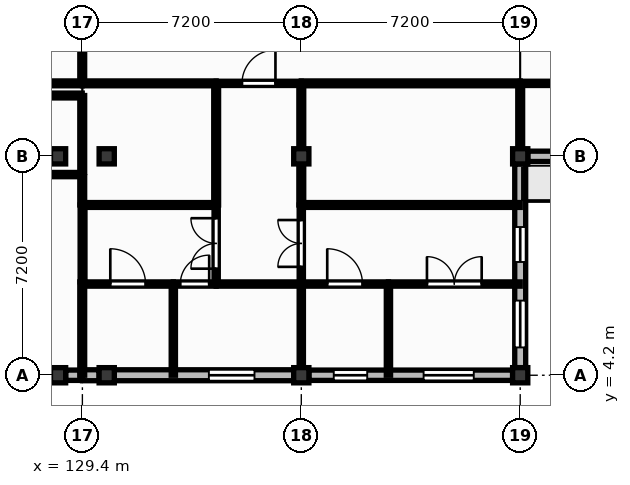
"""IFC4 building model, lengths in metres.
Left out: names, types, materials, properties, quantities, classifications, styles, units other than length and angle.
Written with IfcOpenShell. Run it as: python <this file> out.ifc"""

import sys

from ifc_helpers import new_model, si_unit, direction, frame, frame_2d, origin, origin_2d, place, context, subcontext, project, spatial, rectangle, extrude, element, fill, save


model = new_model("IFC4")
c1 = context("Model", 3, precision=1e-05, world=origin(), true_north=direction((0.0, 1.0)))
c2 = subcontext(c1, "Body", "Model", "MODEL_VIEW")
j1 = project(units=[si_unit("LENGTHUNIT", "METRE"), si_unit("PLANEANGLEUNIT", "RADIAN")], contexts=[c1])
p1 = place(None, origin())
s1 = spatial("IfcSite", under=j1, at=p1, CompositionType="ELEMENT")
p2 = place(p1, origin())
s2 = spatial("IfcBuilding", under=s1, at=p2, CompositionType="ELEMENT")
p3 = place(p2, frame((0.0, 0.0, 4.5)))
s3 = spatial("IfcBuildingStorey", under=s2, at=p3, CompositionType="ELEMENT", Elevation=4.5)
for number, where, z_axis, x_axis in (
    (1, (128.6, 4.2, 0.0), (0.0, 0.0, 1.0), (1.0, 0.0, 0.0)),
    (2, (128.6, 11.4, 0.0), (0.0, 0.0, 1.0), (1.0, 0.0, 0.0)),
    (3, (130.2, 4.2, 0.0), (0.0, 0.0, 1.0), (1.0, 0.0, 0.0)),
    (4, (130.2, 11.4, 0.0), (0.0, 0.0, 1.0), (1.0, 0.0, 0.0)),
    (5, (136.6, 4.2, 0.0), (0.0, 0.0, 1.0), (1.0, 0.0, 0.0)),
    (6, (136.6, 11.4, 0.0), (0.0, 0.0, 1.0), (1.0, 0.0, 0.0)),
    (7, (143.8, 4.2, 0.0), (0.0, 0.0, 1.0), (1.0, 0.0, 0.0)),
    (8, (143.8, 11.4, 0.0), (0.0, 0.0, 1.0), (1.0, 0.0, 0.0)),
):
    element("IfcColumn", number, at=place(p3, frame(where, z_axis=z_axis, x_axis=x_axis)), inside=s3, PredefinedType="COLUMN", context=c2, shape_type="SweptSolid", body=[
        extrude(rectangle(XDim=0.5, YDim=0.5, at=origin_2d()), origin(), (0.0, 0.0, 1.0), 4.22),
    ])
p4 = place(p3, frame((128.85, 4.2, 0.0), z_axis=(0.0, 0.0, 1.0), x_axis=(1.0, 0.0, 0.0)))
e9 = element("IfcWall", 9, at=p4, inside=s3, PredefinedType="SOLIDWALL", context=c2, shape_type="SweptSolid", body=[
    extrude(rectangle(XDim=0.485, YDim=0.34, at=frame_2d((0.242, 0.0))), origin(), (0.0, 0.0, 1.0), 4.22),
])
p5 = place(p3, frame((129.405, 4.2, 0.0), z_axis=(0.0, 0.0, 1.0), x_axis=(1.0, 0.0, 0.0)))
e10 = element("IfcWall", 10, at=p5, inside=s3, PredefinedType="SOLIDWALL", context=c2, shape_type="SweptSolid", body=[
    extrude(rectangle(XDim=0.545, YDim=0.36, at=frame_2d((0.272, 0.0))), origin(), (0.0, 0.0, 1.0), 4.22),
])
p6 = place(p3, frame((130.45, 4.2, 0.0), z_axis=(0.0, 0.0, 1.0), x_axis=(1.0, 0.0, 0.0)))
e11 = element("IfcWall", 11, at=p6, inside=s3, PredefinedType="SOLIDWALL", context=c2, shape_type="SweptSolid", body=[
    extrude(rectangle(XDim=5.9, YDim=0.36, at=frame_2d((2.95, 0.0))), origin(), (0.0, 0.0, 1.0), 3.52),
])
p7 = place(p6, frame((3.111, 0.0, 1.5)))
e12 = element("IfcOpeningElement", 12, at=p7, cuts=e11, PredefinedType="OPENING", context=c2, shape_type="SweptSolid", body=[
    extrude(rectangle(XDim=1.5, YDim=1.25, at=frame_2d((0.75, 0.625))), frame((0.0, 0.19, 0.0), z_axis=(0.0, -1.0, 0.0), x_axis=(1.0, 0.0, 0.0)), (0.0, 0.0, 1.0), 0.38),
])
p8 = place(p3, frame((136.85, 4.2, 0.0), z_axis=(0.0, 0.0, 1.0), x_axis=(1.0, 0.0, 0.0)))
e13 = element("IfcWall", 13, at=p8, inside=s3, PredefinedType="SOLIDWALL", context=c2, shape_type="SweptSolid", body=[
    extrude(rectangle(XDim=6.7, YDim=0.34, at=frame_2d((3.35, 0.0))), origin(), (0.0, 0.0, 1.0), 3.52),
])
p9 = place(p8, frame((0.818, 0.0, 1.0)))
e14 = element("IfcOpeningElement", 14, at=p9, cuts=e13, PredefinedType="OPENING", context=c2, shape_type="SweptSolid", body=[
    extrude(rectangle(XDim=1.1, YDim=1.8, at=frame_2d((0.55, 0.9))), frame((0.0, 0.18, 0.0), z_axis=(0.0, -1.0, 0.0), x_axis=(1.0, 0.0, 0.0)), (0.0, 0.0, 1.0), 0.36),
])
p10 = place(p8, frame((3.773, 0.0, 1.35)))
e15 = element("IfcOpeningElement", 15, at=p10, cuts=e13, PredefinedType="OPENING", context=c2, shape_type="SweptSolid", body=[
    extrude(rectangle(XDim=1.65, YDim=1.4, at=frame_2d((0.825, 0.7))), frame((0.0, 0.18, 0.0), z_axis=(0.0, -1.0, 0.0), x_axis=(1.0, 0.0, 0.0)), (0.0, 0.0, 1.0), 0.36),
])
p11 = place(p3, frame((143.8, 4.45, 0.0), z_axis=(0.0, 0.0, 1.0), x_axis=(0.0, 1.0, 0.0)))
e16 = element("IfcWall", 16, at=p11, inside=s3, PredefinedType="SOLIDWALL", context=c2, shape_type="SweptSolid", body=[
    extrude(rectangle(XDim=6.7, YDim=0.36, at=frame_2d((3.35, 0.0))), origin(), (0.0, 0.0, 1.0), 3.52),
])
p12 = place(p11, frame((0.665, 0.0, 1.05)))
e17 = element("IfcOpeningElement", 17, at=p12, cuts=e16, PredefinedType="OPENING", context=c2, shape_type="SweptSolid", body=[
    extrude(rectangle(XDim=1.54, YDim=1.65, at=frame_2d((0.77, 0.825))), frame((0.0, 0.19, 0.0), z_axis=(0.0, -1.0, 0.0), x_axis=(1.0, 0.0, 0.0)), (0.0, 0.0, 1.0), 0.38),
])
p13 = place(p11, frame((3.475, 0.0, 1.5)))
e18 = element("IfcOpeningElement", 18, at=p13, cuts=e16, PredefinedType="OPENING", context=c2, shape_type="SweptSolid", body=[
    extrude(rectangle(XDim=1.15, YDim=1.25, at=frame_2d((0.575, 0.625))), frame((0.0, 0.19, 0.0), z_axis=(0.0, -1.0, 0.0), x_axis=(1.0, 0.0, 0.0)), (0.0, 0.0, 1.0), 0.38),
])
p14 = place(p3, frame((144.05, 11.4, 0.0), z_axis=(0.0, 0.0, 1.0), x_axis=(1.0, 0.0, 0.0)))
e19 = element("IfcWall", 19, at=p14, inside=s3, PredefinedType="SOLIDWALL", context=c2, shape_type="SweptSolid", body=[
    extrude(rectangle(XDim=6.77, YDim=0.34, at=frame_2d((3.385, 0.0))), origin(), (0.0, 0.0, 1.0), 3.76),
])
p15 = place(p14, frame((1.75, 0.0, 0.0)))
e20 = element("IfcOpeningElement", 20, at=p15, cuts=e19, PredefinedType="OPENING", context=c2, shape_type="SweptSolid", body=[
    extrude(rectangle(XDim=1.18, YDim=2.2, at=frame_2d((0.59, 1.1))), frame((0.0, 0.18, 0.0), z_axis=(0.0, -1.0, 0.0), x_axis=(1.0, 0.0, 0.0)), (0.0, 0.0, 1.0), 0.36),
])
p16 = place(p14, frame((4.4, 0.0, 1.05)))
e21 = element("IfcOpeningElement", 21, at=p16, cuts=e19, PredefinedType="OPENING", context=c2, shape_type="SweptSolid", body=[
    extrude(rectangle(XDim=1.4, YDim=1.65, at=frame_2d((0.7, 0.825))), frame((0.0, 0.18, 0.0), z_axis=(0.0, -1.0, 0.0), x_axis=(1.0, 0.0, 0.0)), (0.0, 0.0, 1.0), 0.36),
])
p17 = place(p3, frame((124.6, 10.8, 0.0), z_axis=(0.0, 0.0, 1.0), x_axis=(1.0, 0.0, 0.0)))
e22 = element("IfcWall", 22, at=p17, inside=s3, PredefinedType="PARTITIONING", context=c2, shape_type="SweptSolid", body=[
    extrude(rectangle(XDim=4.795, YDim=0.14, at=frame_2d((2.397, 0.0))), origin(), (0.0, 0.0, 1.0), 4.18),
])
p18 = place(p3, frame((129.405, 7.2, 0.0), z_axis=(0.0, 0.0, 1.0), x_axis=(1.0, 0.0, 0.0)))
e23 = element("IfcWall", 23, at=p18, inside=s3, PredefinedType="PARTITIONING", context=c2, shape_type="SweptSolid", body=[
    extrude(rectangle(XDim=2.986, YDim=0.14, at=frame_2d((1.493, 0.0))), origin(), (0.0, 0.0, 1.0), 4.18),
])
p19 = place(p18, frame((0.913, 0.0, 0.0)))
e24 = element("IfcOpeningElement", 24, at=p19, cuts=e23, PredefinedType="OPENING", context=c2, shape_type="SweptSolid", body=[
    extrude(rectangle(XDim=1.16, YDim=2.1, at=frame_2d((0.58, 1.05))), frame((0.0, 0.08, 0.0), z_axis=(0.0, -1.0, 0.0), x_axis=(1.0, 0.0, 0.0)), (0.0, 0.0, 1.0), 0.16),
])
p20 = place(p3, frame((132.391, 4.2, 0.0), z_axis=(0.0, 0.0, 1.0), x_axis=(0.0, 1.0, 0.0)))
e25 = element("IfcWall", 25, at=p20, inside=s3, PredefinedType="PARTITIONING", context=c2, shape_type="SweptSolid", body=[
    extrude(rectangle(XDim=2.93, YDim=0.14, at=frame_2d((1.465, 0.0))), origin(), (0.0, 0.0, 1.0), 3.86),
])
p21 = place(p3, frame((132.391, 7.2, 0.0), z_axis=(0.0, 0.0, 1.0), x_axis=(1.0, 0.0, 0.0)))
e26 = element("IfcWall", 26, at=p21, inside=s3, PredefinedType="PARTITIONING", context=c2, shape_type="SweptSolid", body=[
    extrude(rectangle(XDim=1.409, YDim=0.14, at=frame_2d((0.705, 0.0))), origin(), (0.0, 0.0, 1.0), 4.18),
])
p22 = place(p21, frame((0.229, 0.0, 0.0)))
e27 = element("IfcOpeningElement", 27, at=p22, cuts=e26, PredefinedType="OPENING", context=c2, shape_type="SweptSolid", body=[
    extrude(rectangle(XDim=0.95, YDim=2.1, at=frame_2d((0.475, 1.05))), frame((0.0, 0.08, 0.0), z_axis=(0.0, -1.0, 0.0), x_axis=(1.0, 0.0, 0.0)), (0.0, 0.0, 1.0), 0.16),
])
p23 = place(p3, frame((133.8, 7.27, 0.0), z_axis=(0.0, 0.0, 1.0), x_axis=(0.0, 1.0, 0.0)))
e28 = element("IfcWall", 28, at=p23, inside=s3, PredefinedType="PARTITIONING", context=c2, shape_type="SweptSolid", body=[
    extrude(rectangle(XDim=2.53, YDim=0.14, at=frame_2d((1.265, 0.0))), origin(), (0.0, 0.0, 1.0), 4.18),
])
p24 = place(p23, frame((0.435, 0.0, 0.0)))
e29 = element("IfcOpeningElement", 29, at=p24, cuts=e28, PredefinedType="OPENING", context=c2, shape_type="SweptSolid", body=[
    extrude(rectangle(XDim=1.66, YDim=2.3, at=frame_2d((0.83, 1.15))), frame((0.0, 0.08, 0.0), z_axis=(0.0, -1.0, 0.0), x_axis=(1.0, 0.0, 0.0)), (0.0, 0.0, 1.0), 0.16),
])
p25 = place(p3, frame((133.8, 7.2, 0.0), z_axis=(0.0, 0.0, 1.0), x_axis=(1.0, 0.0, 0.0)))
e30 = element("IfcWall", 30, at=p25, inside=s3, PredefinedType="PARTITIONING", context=c2, shape_type="SweptSolid", body=[
    extrude(rectangle(XDim=2.8, YDim=0.14, at=frame_2d((1.4, 0.0))), origin(), (0.0, 0.0, 1.0), 4.18),
])
p26 = place(p3, frame((133.8, 13.8, 0.0), z_axis=(0.0, 0.0, 1.0), x_axis=(1.0, 0.0, 0.0)))
e31 = element("IfcWall", 31, at=p26, inside=s3, PredefinedType="PARTITIONING", context=c2, shape_type="SweptSolid", body=[
    extrude(rectangle(XDim=2.8, YDim=0.14, at=frame_2d((1.4, 0.0))), origin(), (0.0, 0.0, 1.0), 4.18),
])
p27 = place(p26, frame((0.85, 0.0, 0.0)))
e32 = element("IfcOpeningElement", 32, at=p27, cuts=e31, PredefinedType="OPENING", context=c2, shape_type="SweptSolid", body=[
    extrude(rectangle(XDim=1.1, YDim=2.1, at=frame_2d((0.55, 1.05))), frame((0.0, 0.08, 0.0), z_axis=(0.0, -1.0, 0.0), x_axis=(1.0, 0.0, 0.0)), (0.0, 0.0, 1.0), 0.16),
])
p28 = place(p3, frame((136.6, 4.45, 0.0), z_axis=(0.0, 0.0, 1.0), x_axis=(0.0, 1.0, 0.0)))
e33 = element("IfcWall", 33, at=p28, inside=s3, PredefinedType="PARTITIONING", context=c2, shape_type="SweptSolid", body=[
    extrude(rectangle(XDim=2.68, YDim=0.14, at=frame_2d((1.34, 0.0))), origin(), (0.0, 0.0, 1.0), 3.52),
])
p29 = place(p3, frame((136.6, 7.27, 0.0), z_axis=(0.0, 0.0, 1.0), x_axis=(0.0, 1.0, 0.0)))
e34 = element("IfcWall", 34, at=p29, inside=s3, PredefinedType="PARTITIONING", context=c2, shape_type="SweptSolid", body=[
    extrude(rectangle(XDim=2.53, YDim=0.14, at=frame_2d((1.265, 0.0))), origin(), (0.0, 0.0, 1.0), 3.52),
])
p30 = place(p29, frame((0.495, 0.0, 0.0)))
e35 = element("IfcOpeningElement", 35, at=p30, cuts=e34, PredefinedType="OPENING", context=c2, shape_type="SweptSolid", body=[
    extrude(rectangle(XDim=1.54, YDim=2.25, at=frame_2d((0.77, 1.125))), frame((0.0, 0.08, 0.0), z_axis=(0.0, -1.0, 0.0), x_axis=(1.0, 0.0, 0.0)), (0.0, 0.0, 1.0), 0.16),
])
p31 = place(p3, frame((136.6, 7.2, 0.0), z_axis=(0.0, 0.0, 1.0), x_axis=(1.0, 0.0, 0.0)))
e36 = element("IfcWall", 36, at=p31, inside=s3, PredefinedType="PARTITIONING", context=c2, shape_type="SweptSolid", body=[
    extrude(rectangle(XDim=2.866, YDim=0.14, at=frame_2d((1.433, 0.0))), origin(), (0.0, 0.0, 1.0), 4.18),
])
p32 = place(p31, frame((0.853, 0.0, 0.0)))
e37 = element("IfcOpeningElement", 37, at=p32, cuts=e36, PredefinedType="OPENING", context=c2, shape_type="SweptSolid", body=[
    extrude(rectangle(XDim=1.16, YDim=2.1, at=frame_2d((0.58, 1.05))), frame((0.0, 0.08, 0.0), z_axis=(0.0, -1.0, 0.0), x_axis=(1.0, 0.0, 0.0)), (0.0, 0.0, 1.0), 0.16),
])
p33 = place(p3, frame((139.466, 4.2, 0.0), z_axis=(0.0, 0.0, 1.0), x_axis=(0.0, 1.0, 0.0)))
e38 = element("IfcWall", 38, at=p33, inside=s3, PredefinedType="PARTITIONING", context=c2, shape_type="SweptSolid", body=[
    extrude(rectangle(XDim=2.93, YDim=0.14, at=frame_2d((1.465, 0.0))), origin(), (0.0, 0.0, 1.0), 4.18),
])
p34 = place(p3, frame((139.466, 7.2, 0.0), z_axis=(0.0, 0.0, 1.0), x_axis=(1.0, 0.0, 0.0)))
e39 = element("IfcWall", 39, at=p34, inside=s3, PredefinedType="PARTITIONING", context=c2, shape_type="SweptSolid", body=[
    extrude(rectangle(XDim=4.334, YDim=0.14, at=frame_2d((2.167, 0.0))), origin(), (0.0, 0.0, 1.0), 4.18),
])
p35 = place(p34, frame((1.267, 0.0, 0.0)))
e40 = element("IfcOpeningElement", 40, at=p35, cuts=e39, PredefinedType="OPENING", context=c2, shape_type="SweptSolid", body=[
    extrude(rectangle(XDim=1.8, YDim=2.3, at=frame_2d((0.9, 1.15))), frame((0.0, 0.08, 0.0), z_axis=(0.0, -1.0, 0.0), x_axis=(1.0, 0.0, 0.0)), (0.0, 0.0, 1.0), 0.16),
])
p36 = place(p3, frame((143.8, 13.8, 0.0), z_axis=(0.0, 0.0, 1.0), x_axis=(1.0, 0.0, 0.0)))
e41 = element("IfcWall", 41, at=p36, inside=s3, PredefinedType="PARTITIONING", context=c2, shape_type="SweptSolid", body=[
    extrude(rectangle(XDim=3.8, YDim=0.14, at=frame_2d((1.9, 0.0))), origin(), (0.0, 0.0, 1.0), 4.18),
])
p37 = place(p36, frame((1.44, 0.0, 0.0)))
e42 = element("IfcOpeningElement", 42, at=p37, cuts=e41, PredefinedType="OPENING", context=c2, shape_type="SweptSolid", body=[
    extrude(rectangle(XDim=0.92, YDim=2.1, at=frame_2d((0.46, 1.05))), frame((0.0, 0.08, 0.0), z_axis=(0.0, -1.0, 0.0), x_axis=(1.0, 0.0, 0.0)), (0.0, 0.0, 1.0), 0.16),
])
p38 = place(p3, frame((129.395, 10.87, 0.0), z_axis=(0.0, 0.0, 1.0), x_axis=(0.0, 1.0, 0.0)))
e43 = element("IfcWall", 43, at=p38, inside=s3, PredefinedType="PARTITIONING", context=c2, shape_type="SweptSolid", body=[
    extrude(rectangle(XDim=2.53, YDim=0.16, at=frame_2d((1.265, 0.0))), origin(), (0.0, 0.0, 1.0), 4.18),
])
for number, where, z_axis, x_axis in (
    (44, (129.395, 13.4, 0.0), (0.0, 0.0, 1.0), (-1.0, 0.0, 0.0)),
    (45, (124.6, 13.8, 0.0), (0.0, 0.0, 1.0), (1.0, 0.0, 0.0)),
):
    element("IfcWall", number, at=place(p3, frame(where, z_axis=z_axis, x_axis=x_axis)), inside=s3, PredefinedType="PARTITIONING", context=c2, shape_type="SweptSolid", body=[
        extrude(rectangle(XDim=4.795, YDim=0.16, at=frame_2d((2.397, 0.0))), origin(), (0.0, 0.0, 1.0), 4.18),
    ])
p39 = place(p3, frame((129.395, 13.8, 0.0), z_axis=(0.0, 0.0, 1.0), x_axis=(0.0, 1.0, 0.0)))
e46 = element("IfcWall", 46, at=p39, inside=s3, PredefinedType="PARTITIONING", context=c2, shape_type="SweptSolid", body=[
    extrude(rectangle(XDim=2.6, YDim=0.16, at=frame_2d((1.3, 0.0))), origin(), (0.0, 0.0, 1.0), 4.18),
])
p40 = place(p3, frame((129.405, 13.8, 0.0), z_axis=(0.0, 0.0, 1.0), x_axis=(1.0, 0.0, 0.0)))
e47 = element("IfcWall", 47, at=p40, inside=s3, PredefinedType="PARTITIONING", context=c2, shape_type="SweptSolid", body=[
    extrude(rectangle(XDim=4.395, YDim=0.16, at=frame_2d((2.198, 0.0))), origin(), (0.0, 0.0, 1.0), 4.18),
])
p41 = place(p3, frame((136.6, 13.8, 0.0), z_axis=(0.0, 0.0, 1.0), x_axis=(1.0, 0.0, 0.0)))
e48 = element("IfcWall", 48, at=p41, inside=s3, PredefinedType="PARTITIONING", context=c2, shape_type="SweptSolid", body=[
    extrude(rectangle(XDim=7.2, YDim=0.16, at=frame_2d((3.6, 0.0))), origin(), (0.0, 0.0, 1.0), 4.18),
])
p42 = place(p3, frame((143.8, 11.65, 0.0), z_axis=(0.0, 0.0, 1.0), x_axis=(0.0, 1.0, 0.0)))
e49 = element("IfcWall", 49, at=p42, inside=s3, PredefinedType="PARTITIONING", context=c2, shape_type="SweptSolid", body=[
    extrude(rectangle(XDim=2.08, YDim=0.16, at=frame_2d((1.04, 0.0))), origin(), (0.0, 0.0, 1.0), 3.52),
])
p43 = place(p3, frame((136.6, 9.8, 0.0), z_axis=(0.0, 0.0, 1.0), x_axis=(0.0, 1.0, 0.0)))
e50 = element("IfcWall", 50, at=p43, inside=s3, PredefinedType="PARTITIONING", context=c2, shape_type="SweptSolid", body=[
    extrude(rectangle(XDim=1.35, YDim=0.16, at=frame_2d((0.675, 0.0))), origin(), (0.0, 0.0, 1.0), 3.52),
])
p44 = place(p3, frame((136.6, 11.65, 0.0), z_axis=(0.0, 0.0, 1.0), x_axis=(0.0, 1.0, 0.0)))
e51 = element("IfcWall", 51, at=p44, inside=s3, PredefinedType="PARTITIONING", context=c2, shape_type="SweptSolid", body=[
    extrude(rectangle(XDim=2.08, YDim=0.16, at=frame_2d((1.04, 0.0))), origin(), (0.0, 0.0, 1.0), 3.52),
])
p45 = place(p3, frame((133.8, 9.8, 0.0), z_axis=(0.0, 0.0, 1.0), x_axis=(0.0, 1.0, 0.0)))
e52 = element("IfcWall", 52, at=p45, inside=s3, PredefinedType="PARTITIONING", context=c2, shape_type="SweptSolid", body=[
    extrude(rectangle(XDim=3.93, YDim=0.16, at=frame_2d((1.965, 0.0))), origin(), (0.0, 0.0, 1.0), 4.18),
])
p46 = place(p3, frame((133.8, 9.8, 0.0), z_axis=(0.0, 0.0, 1.0), x_axis=(-1.0, 0.0, 0.0)))
e53 = element("IfcWall", 53, at=p46, inside=s3, PredefinedType="PARTITIONING", context=c2, shape_type="SweptSolid", body=[
    extrude(rectangle(XDim=4.395, YDim=0.16, at=frame_2d((2.198, 0.0))), origin(), (0.0, 0.0, 1.0), 4.18),
])
p47 = place(p3, frame((129.405, 7.27, 0.0), z_axis=(0.0, 0.0, 1.0), x_axis=(0.0, 1.0, 0.0)))
e54 = element("IfcWall", 54, at=p47, inside=s3, PredefinedType="PARTITIONING", context=c2, shape_type="SweptSolid", body=[
    extrude(rectangle(XDim=2.53, YDim=0.16, at=frame_2d((1.265, 0.0))), origin(), (0.0, 0.0, 1.0), 4.18),
])
p48 = place(p3, frame((143.8, 9.8, 0.0), z_axis=(0.0, 0.0, 1.0), x_axis=(-1.0, 0.0, 0.0)))
e55 = element("IfcWall", 55, at=p48, inside=s3, PredefinedType="PARTITIONING", context=c2, shape_type="SweptSolid", body=[
    extrude(rectangle(XDim=7.2, YDim=0.16, at=frame_2d((3.6, 0.0))), origin(), (0.0, 0.0, 1.0), 4.18),
])
p49 = place(p3, frame((129.395, 4.2, 0.0), z_axis=(0.0, 0.0, 1.0), x_axis=(0.0, 1.0, 0.0)))
e56 = element("IfcWall", 56, at=p49, inside=s3, PredefinedType="PARTITIONING", context=c2, shape_type="SweptSolid", body=[
    extrude(rectangle(XDim=3.07, YDim=0.16, at=frame_2d((1.535, 0.0))), origin(), (0.0, 0.0, 1.0), 4.18),
])
p50 = place(p3, frame((129.395, 9.8, 0.0), z_axis=(0.0, 0.0, 1.0), x_axis=(0.0, 1.0, 0.0)))
e57 = element("IfcWall", 57, at=p50, inside=s3, PredefinedType="PARTITIONING", context=c2, shape_type="SweptSolid", body=[
    extrude(rectangle(XDim=0.93, YDim=0.16, at=frame_2d((0.465, 0.0))), origin(), (0.0, 0.0, 1.0), 4.18),
])
p51 = place(p7, origin())
e58 = element("IfcWindow", 58, at=p51, inside=s3, PartitioningType="DOUBLE_PANEL_VERTICAL", PredefinedType="WINDOW", context=c2, shape_type="SweptSolid", body=[
    extrude(rectangle(XDim=1.5, YDim=1.25, at=frame_2d((0.75, 0.625))), frame((0.0, 0.03, 0.0), z_axis=(0.0, -1.0, 0.0), x_axis=(1.0, 0.0, 0.0)), (0.0, 0.0, 1.0), 0.06),
])
fill(e12, e58)
p52 = place(p9, origin())
e59 = element("IfcWindow", 59, at=p52, inside=s3, PartitioningType="SINGLE_PANEL", PredefinedType="WINDOW", context=c2, shape_type="SweptSolid", body=[
    extrude(rectangle(XDim=1.1, YDim=1.8, at=frame_2d((0.55, 0.9))), frame((0.0, 0.03, 0.0), z_axis=(0.0, -1.0, 0.0), x_axis=(1.0, 0.0, 0.0)), (0.0, 0.0, 1.0), 0.06),
])
fill(e14, e59)
p53 = place(p10, origin())
e60 = element("IfcWindow", 60, at=p53, inside=s3, PartitioningType="DOUBLE_PANEL_VERTICAL", PredefinedType="WINDOW", context=c2, shape_type="SweptSolid", body=[
    extrude(rectangle(XDim=1.65, YDim=1.4, at=frame_2d((0.825, 0.7))), frame((0.0, 0.03, 0.0), z_axis=(0.0, -1.0, 0.0), x_axis=(1.0, 0.0, 0.0)), (0.0, 0.0, 1.0), 0.06),
])
fill(e15, e60)
p54 = place(p12, origin())
e61 = element("IfcWindow", 61, at=p54, inside=s3, PartitioningType="DOUBLE_PANEL_VERTICAL", PredefinedType="WINDOW", context=c2, shape_type="SweptSolid", body=[
    extrude(rectangle(XDim=1.54, YDim=1.65, at=frame_2d((0.77, 0.825))), frame((0.0, 0.03, 0.0), z_axis=(0.0, -1.0, 0.0), x_axis=(1.0, 0.0, 0.0)), (0.0, 0.0, 1.0), 0.06),
])
fill(e17, e61)
p55 = place(p13, origin())
e62 = element("IfcWindow", 62, at=p55, inside=s3, PartitioningType="SINGLE_PANEL", PredefinedType="WINDOW", context=c2, shape_type="SweptSolid", body=[
    extrude(rectangle(XDim=1.15, YDim=1.25, at=frame_2d((0.575, 0.625))), frame((0.0, 0.03, 0.0), z_axis=(0.0, -1.0, 0.0), x_axis=(1.0, 0.0, 0.0)), (0.0, 0.0, 1.0), 0.06),
])
fill(e18, e62)
p56 = place(p27, origin())
e63 = element("IfcDoor", 63, at=p56, inside=s3, OperationType="SINGLE_SWING_RIGHT", PredefinedType="DOOR", context=c2, shape_type="SweptSolid", body=[
    extrude(rectangle(XDim=1.1, YDim=2.1, at=frame_2d((0.55, 1.05))), frame((0.0, 0.025, 0.0), z_axis=(0.0, -1.0, 0.0), x_axis=(1.0, 0.0, 0.0)), (0.0, 0.0, 1.0), 0.05),
])
fill(e32, e63)
p57 = place(p24, origin())
e64 = element("IfcDoor", 64, at=p57, inside=s3, OperationType="DOUBLE_DOOR_SINGLE_SWING", PredefinedType="DOOR", context=c2, shape_type="SweptSolid", body=[
    extrude(rectangle(XDim=1.66, YDim=2.3, at=frame_2d((0.83, 1.15))), frame((0.0, 0.025, 0.0), z_axis=(0.0, -1.0, 0.0), x_axis=(1.0, 0.0, 0.0)), (0.0, 0.0, 1.0), 0.05),
])
fill(e29, e64)
p58 = place(p30, origin())
e65 = element("IfcDoor", 65, at=p58, inside=s3, OperationType="DOUBLE_DOOR_SINGLE_SWING", PredefinedType="DOOR", context=c2, shape_type="SweptSolid", body=[
    extrude(rectangle(XDim=1.54, YDim=2.25, at=frame_2d((0.77, 1.125))), frame((0.0, 0.025, 0.0), z_axis=(0.0, -1.0, 0.0), x_axis=(1.0, 0.0, 0.0)), (0.0, 0.0, 1.0), 0.05),
])
fill(e35, e65)
p59 = place(p19, origin())
e66 = element("IfcDoor", 66, at=p59, inside=s3, OperationType="SINGLE_SWING_LEFT", PredefinedType="DOOR", context=c2, shape_type="SweptSolid", body=[
    extrude(rectangle(XDim=1.16, YDim=2.1, at=frame_2d((0.58, 1.05))), frame((0.0, 0.025, 0.0), z_axis=(0.0, -1.0, 0.0), x_axis=(1.0, 0.0, 0.0)), (0.0, 0.0, 1.0), 0.05),
])
fill(e24, e66)
p60 = place(p22, origin())
e67 = element("IfcDoor", 67, at=p60, inside=s3, OperationType="SINGLE_SWING_RIGHT", PredefinedType="DOOR", context=c2, shape_type="SweptSolid", body=[
    extrude(rectangle(XDim=0.95, YDim=2.1, at=frame_2d((0.475, 1.05))), frame((0.0, 0.025, 0.0), z_axis=(0.0, -1.0, 0.0), x_axis=(1.0, 0.0, 0.0)), (0.0, 0.0, 1.0), 0.05),
])
fill(e27, e67)
p61 = place(p32, origin())
e68 = element("IfcDoor", 68, at=p61, inside=s3, OperationType="SINGLE_SWING_LEFT", PredefinedType="DOOR", context=c2, shape_type="SweptSolid", body=[
    extrude(rectangle(XDim=1.16, YDim=2.1, at=frame_2d((0.58, 1.05))), frame((0.0, 0.025, 0.0), z_axis=(0.0, -1.0, 0.0), x_axis=(1.0, 0.0, 0.0)), (0.0, 0.0, 1.0), 0.05),
])
fill(e37, e68)
p62 = place(p35, origin())
e69 = element("IfcDoor", 69, at=p62, inside=s3, OperationType="DOUBLE_DOOR_SINGLE_SWING", PredefinedType="DOOR", context=c2, shape_type="SweptSolid", body=[
    extrude(rectangle(XDim=1.8, YDim=2.3, at=frame_2d((0.9, 1.15))), frame((0.0, 0.025, 0.0), z_axis=(0.0, -1.0, 0.0), x_axis=(1.0, 0.0, 0.0)), (0.0, 0.0, 1.0), 0.05),
])
fill(e40, e69)
save(model, sys.argv[1])
